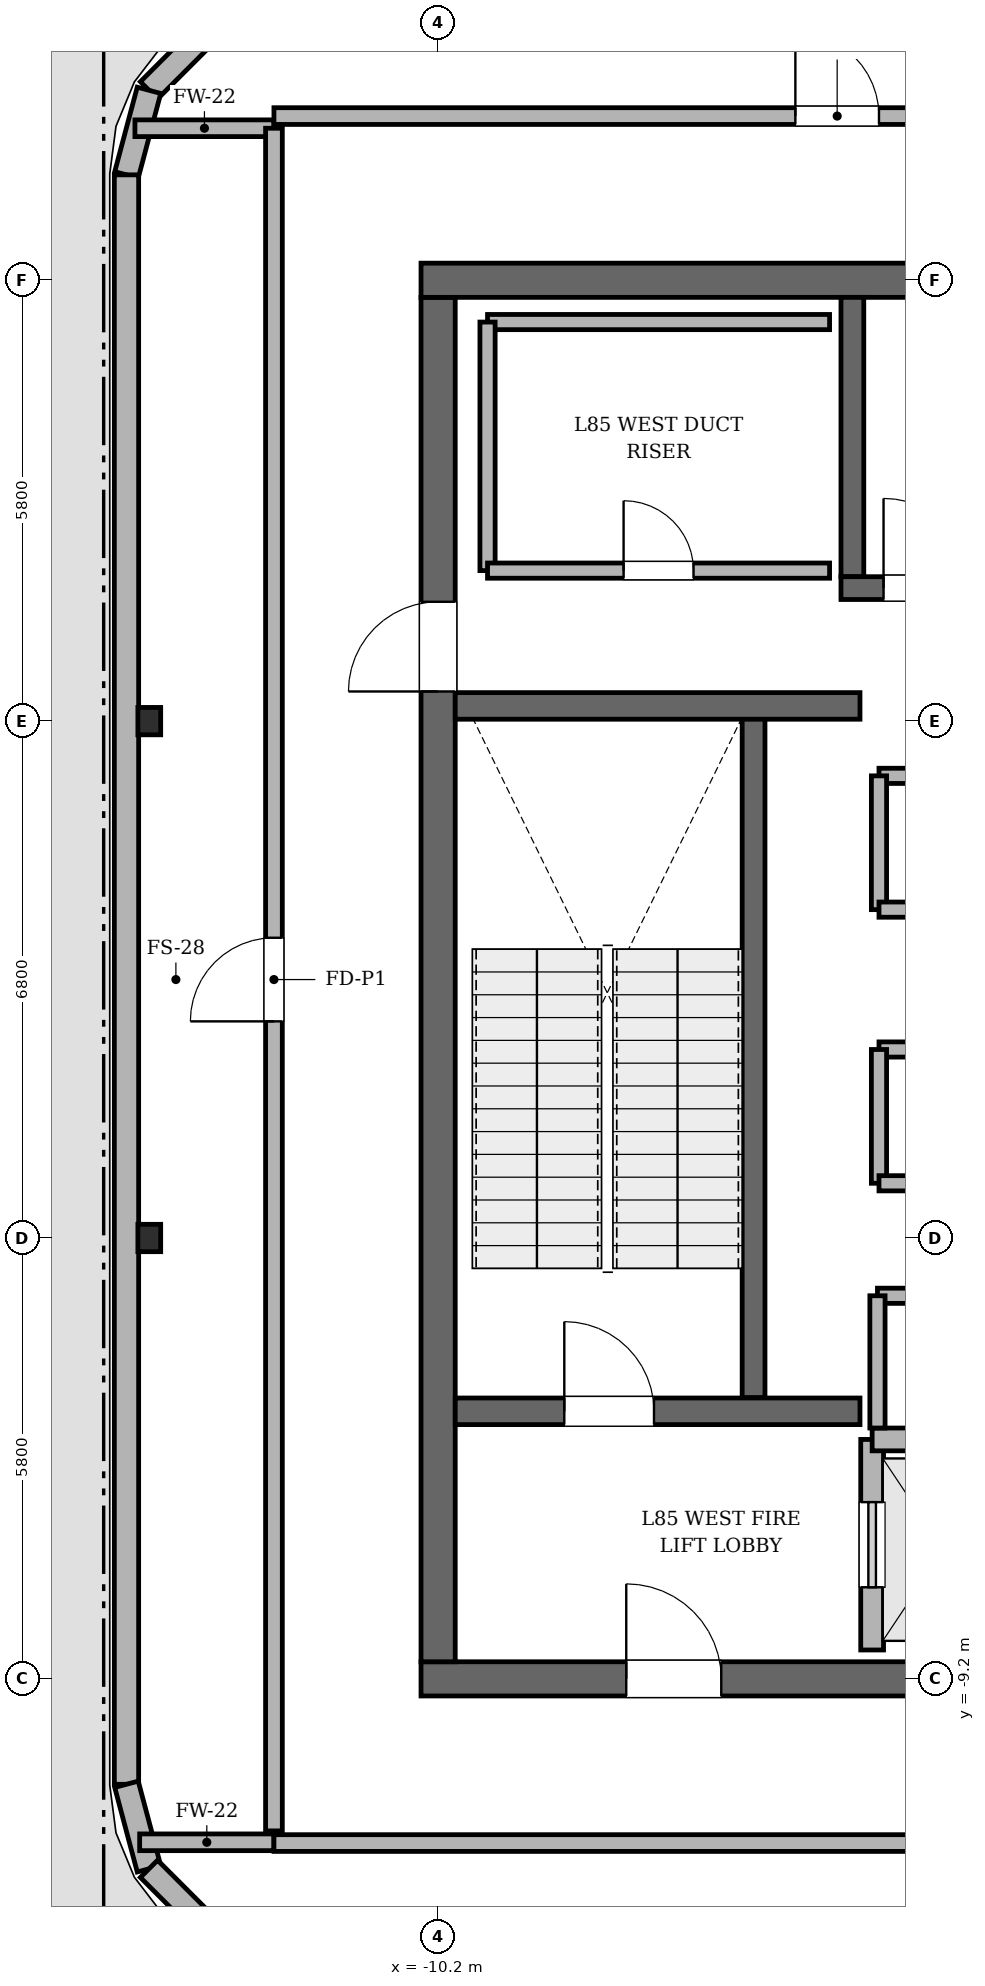
"""IFC4 building model, lengths in metres.
Left out: names, types, materials, properties, quantities, classifications, styles, units other than length and angle.
Written with IfcOpenShell. Run it as: python <this file> out.ifc"""

import sys

from ifc_helpers import new_model, si_unit, direction, frame, frame_2d, origin, origin_2d, place, context, subcontext, project, spatial, rectangle, i_section, extrude, element, fill, save


model = new_model("IFC4")
c1 = context("Model", 3, precision=1e-05, world=origin(), true_north=direction((0.0, 1.0)))
c2 = subcontext(c1, "Body", "Model", "MODEL_VIEW")
j1 = project(units=[si_unit("LENGTHUNIT", "METRE"), si_unit("PLANEANGLEUNIT", "RADIAN")], contexts=[c1])
p1 = place(None, origin())
s1 = spatial("IfcSite", under=j1, at=p1, CompositionType="ELEMENT")
p2 = place(p1, origin())
s2 = spatial("IfcBuilding", under=s1, at=p2, CompositionType="ELEMENT")
p3 = place(p2, frame((0.0, 0.0, 361.8)))
s3 = spatial("IfcBuildingStorey", under=s2, at=p3, CompositionType="ELEMENT", Elevation=361.8)
p4 = place(p3, frame((10.425, -9.2, 0.0), z_axis=(0.0, 0.0, 1.0), x_axis=(-1.0, 0.0, 0.0)))
e1 = element("IfcWall", 1, at=p4, inside=s3, PredefinedType="SHEAR", context=c2, shape_type="SweptSolid", body=[
    extrude(rectangle(XDim=20.85, YDim=0.45, at=frame_2d((10.425, 0.0))), origin(), (0.0, 0.0, 1.0), 4.5),
])
p5 = place(p4, frame((2.7, 0.0, 0.0)))
e2 = element("IfcOpeningElement", 2, at=p5, cuts=e1, PredefinedType="OPENING", context=c2, shape_type="SweptSolid", body=[
    extrude(rectangle(XDim=1.25, YDim=2.25, at=frame_2d((0.625, 1.125))), frame((0.0, 0.235, 0.0), z_axis=(0.0, -1.0, 0.0), x_axis=(1.0, 0.0, 0.0)), (0.0, 0.0, 1.0), 0.47),
])
p6 = place(p4, frame((16.9, 0.0, 0.0)))
e3 = element("IfcOpeningElement", 3, at=p6, cuts=e1, PredefinedType="OPENING", context=c2, shape_type="SweptSolid", body=[
    extrude(rectangle(XDim=1.25, YDim=2.25, at=frame_2d((0.625, 1.125))), frame((0.0, 0.235, 0.0), z_axis=(0.0, -1.0, 0.0), x_axis=(1.0, 0.0, 0.0)), (0.0, 0.0, 1.0), 0.47),
])
p7 = place(p3, frame((-10.2, -8.975, 0.0), z_axis=(0.0, 0.0, 1.0), x_axis=(0.0, 1.0, 0.0)))
e4 = element("IfcWall", 4, at=p7, inside=s3, PredefinedType="SHEAR", context=c2, shape_type="SweptSolid", body=[
    extrude(rectangle(XDim=17.95, YDim=0.45, at=frame_2d((8.975, 0.0))), origin(), (0.0, 0.0, 1.0), 4.5),
])
p8 = place(p7, frame((12.765, 0.0, 0.0)))
e5 = element("IfcOpeningElement", 5, at=p8, cuts=e4, PredefinedType="OPENING", context=c2, shape_type="SweptSolid", body=[
    extrude(rectangle(XDim=1.18, YDim=2.2, at=frame_2d((0.59, 1.1))), frame((0.0, 0.235, 0.0), z_axis=(0.0, -1.0, 0.0), x_axis=(1.0, 0.0, 0.0)), (0.0, 0.0, 1.0), 0.47),
])
p9 = place(p3, frame((-10.425, 9.2, 0.0), z_axis=(0.0, 0.0, 1.0), x_axis=(1.0, 0.0, 0.0)))
e6 = element("IfcWall", 6, at=p9, inside=s3, PredefinedType="SHEAR", context=c2, shape_type="SweptSolid", body=[
    extrude(rectangle(XDim=20.85, YDim=0.45, at=frame_2d((10.425, 0.0))), origin(), (0.0, 0.0, 1.0), 4.5),
])
p10 = place(p3, frame((-6.05, -5.5, 0.0), z_axis=(0.0, 0.0, 1.0), x_axis=(0.0, 1.0, 0.0)))
e7 = element("IfcWall", 7, at=p10, inside=s3, PredefinedType="SOLIDWALL", context=c2, shape_type="SweptSolid", body=[
    extrude(rectangle(XDim=8.95, YDim=0.3, at=frame_2d((4.475, 0.0))), origin(), (0.0, 0.0, 1.0), 4.5),
])
p11 = place(p3, frame((-4.75, 5.3, 0.0), z_axis=(0.0, 0.0, 1.0), x_axis=(0.0, 1.0, 0.0)))
e8 = element("IfcWall", 8, at=p11, inside=s3, PredefinedType="SOLIDWALL", context=c2, shape_type="SweptSolid", body=[
    extrude(rectangle(XDim=3.675, YDim=0.3, at=frame_2d((1.837, 0.0))), origin(), (0.0, 0.0, 1.0), 4.5),
])
p12 = place(p3, frame((-4.9, 5.15, 0.0), z_axis=(0.0, 0.0, 1.0), x_axis=(1.0, 0.0, 0.0)))
e9 = element("IfcWall", 9, at=p12, inside=s3, PredefinedType="SOLIDWALL", context=c2, shape_type="SweptSolid", body=[
    extrude(rectangle(XDim=9.8, YDim=0.3, at=frame_2d((4.9, 0.0))), origin(), (0.0, 0.0, 1.0), 4.5),
])
p13 = place(p12, frame((0.56, 0.0, 0.0)))
e10 = element("IfcOpeningElement", 10, at=p13, cuts=e9, PredefinedType="OPENING", context=c2, shape_type="SweptSolid", body=[
    extrude(rectangle(XDim=1.18, YDim=2.2, at=frame_2d((0.59, 1.1))), frame((0.0, 0.16, 0.0), z_axis=(0.0, -1.0, 0.0), x_axis=(1.0, 0.0, 0.0)), (0.0, 0.0, 1.0), 0.32),
])
p14 = place(p3, frame((-9.975, -5.68, 0.0), z_axis=(0.0, 0.0, 1.0), x_axis=(1.0, 0.0, 0.0)))
e11 = element("IfcWall", 11, at=p14, inside=s3, PredefinedType="SOLIDWALL", context=c2, shape_type="SweptSolid", body=[
    extrude(rectangle(XDim=5.325, YDim=0.35, at=frame_2d((2.663, 0.0))), origin(), (0.0, 0.0, 1.0), 4.5),
])
p15 = place(p14, frame((1.435, 0.0, 0.0)))
e12 = element("IfcOpeningElement", 12, at=p15, cuts=e11, PredefinedType="OPENING", context=c2, shape_type="SweptSolid", body=[
    extrude(rectangle(XDim=1.18, YDim=2.2, at=frame_2d((0.59, 1.1))), frame((0.0, 0.185, 0.0), z_axis=(0.0, -1.0, 0.0), x_axis=(1.0, 0.0, 0.0)), (0.0, 0.0, 1.0), 0.37),
])
p16 = place(p3, frame((-9.975, 3.6, 0.0), z_axis=(0.0, 0.0, 1.0), x_axis=(1.0, 0.0, 0.0)))
e13 = element("IfcWall", 13, at=p16, inside=s3, PredefinedType="SOLIDWALL", context=c2, shape_type="SweptSolid", body=[
    extrude(rectangle(XDim=5.325, YDim=0.35, at=frame_2d((2.663, 0.0))), origin(), (0.0, 0.0, 1.0), 4.5),
])
for number, where, z_axis, x_axis in (
    (14, (-14.0, -3.4, 0.0), (0.0, 0.0, 1.0), (1.0, 0.0, 0.0)),
    (15, (-14.0, 3.4, 0.0), (0.0, 0.0, 1.0), (1.0, 0.0, 0.0)),
):
    element("IfcColumn", number, at=place(p3, frame(where, z_axis=z_axis, x_axis=x_axis)), inside=s3, PredefinedType="COLUMN", context=c2, shape_type="SweptSolid", body=[
        extrude(i_section(OverallWidth=0.3, OverallDepth=0.36, WebThickness=0.012, FlangeThickness=0.022, FilletRadius=0.018, at=origin_2d()), origin(), (0.0, 0.0, 1.0), 4.498),
    ])
p17 = place(p3, frame((-13.199, 12.504, 0.0), z_axis=(0.0, 0.0, 1.0), x_axis=(-0.707106781187, -0.707106781187, 0.0)))
e16 = element("IfcWall", 16, at=p17, inside=s3, PredefinedType="SOLIDWALL", context=c2, shape_type="SweptSolid", body=[
    extrude(rectangle(XDim=1.138, YDim=0.32, at=frame_2d((0.569, 0.0))), origin(), (0.0, 0.0, 1.0), 2.994),
])
p18 = place(p3, frame((-14.004, 11.699, 0.0), z_axis=(0.0, 0.0, 1.0), x_axis=(-0.25727979053, -0.966336954372, 0.0)))
e17 = element("IfcWall", 17, at=p18, inside=s3, PredefinedType="SOLIDWALL", context=c2, shape_type="SweptSolid", body=[
    extrude(rectangle(XDim=1.151, YDim=0.32, at=frame_2d((0.576, 0.0))), origin(), (0.0, 0.0, 1.0), 2.994),
])
p19 = place(p3, frame((-14.3, 10.587, 0.0), z_axis=(0.0, 0.0, 1.0), x_axis=(0.0, -1.0, 0.0)))
e18 = element("IfcWall", 18, at=p19, inside=s3, PredefinedType="SOLIDWALL", context=c2, shape_type="SweptSolid", body=[
    extrude(rectangle(XDim=21.174, YDim=0.32, at=frame_2d((10.587, 0.0))), origin(), (0.0, 0.0, 1.0), 2.994),
])
p20 = place(p3, frame((-14.3, -10.587, 0.0), z_axis=(0.0, 0.0, 1.0), x_axis=(0.25727979053, -0.966336954372, 0.0)))
e19 = element("IfcWall", 19, at=p20, inside=s3, PredefinedType="SOLIDWALL", context=c2, shape_type="SweptSolid", body=[
    extrude(rectangle(XDim=1.151, YDim=0.32, at=frame_2d((0.576, 0.0))), origin(), (0.0, 0.0, 1.0), 2.994),
])
p21 = place(p3, frame((-14.004, -11.699, 0.0), z_axis=(0.0, 0.0, 1.0), x_axis=(0.707106781187, -0.707106781187, 0.0)))
e20 = element("IfcWall", 20, at=p21, inside=s3, PredefinedType="SOLIDWALL", context=c2, shape_type="SweptSolid", body=[
    extrude(rectangle(XDim=1.138, YDim=0.32, at=frame_2d((0.569, 0.0))), origin(), (0.0, 0.0, 1.0), 2.994),
])
p22 = place(p3, frame((-4.49, -8.82, 0.0), z_axis=(0.0, 0.0, 1.0), x_axis=(0.0, 1.0, 0.0)))
e21 = element("IfcWall", 21, at=p22, inside=s3, PredefinedType="SOLIDWALL", context=c2, shape_type="SweptSolid", body=[
    extrude(rectangle(XDim=2.77, YDim=0.3, at=frame_2d((1.385, 0.0))), origin(), (0.0, 0.0, 1.0), 4.28),
])
p23 = place(p22, frame((0.825, 0.0, 0.0)))
e22 = element("IfcOpeningElement", 22, at=p23, cuts=e21, PredefinedType="OPENING", context=c2, shape_type="SweptSolid", body=[
    extrude(rectangle(XDim=1.12, YDim=2.25, at=frame_2d((0.56, 1.125))), frame((0.0, 0.16, 0.0), z_axis=(0.0, -1.0, 0.0), x_axis=(1.0, 0.0, 0.0)), (0.0, 0.0, 1.0), 0.32),
])
p24 = place(p3, frame((-4.49, -6.05, 0.0), z_axis=(0.0, 0.0, 1.0), x_axis=(1.0, 0.0, 0.0)))
e23 = element("IfcWall", 23, at=p24, inside=s3, PredefinedType="SOLIDWALL", context=c2, shape_type="SweptSolid", body=[
    extrude(rectangle(XDim=1.88, YDim=0.3, at=frame_2d((0.94, 0.0))), origin(), (0.0, 0.0, 1.0), 4.28),
])
p25 = place(p3, frame((-2.32, -4.16, 0.0), z_axis=(0.0, 0.0, 1.0), x_axis=(-1.0, 0.0, 0.0)))
e24 = element("IfcWall", 24, at=p25, inside=s3, PredefinedType="SOLIDWALL", context=c2, shape_type="SweptSolid", body=[
    extrude(rectangle(XDim=2.1, YDim=0.2, at=frame_2d((1.05, 0.0))), origin(), (0.0, 0.0, 1.0), 4.28),
])
p26 = place(p25, frame((0.575, 0.0, 0.0)))
e25 = element("IfcOpeningElement", 25, at=p26, cuts=e24, PredefinedType="OPENING", context=c2, shape_type="SweptSolid", body=[
    extrude(rectangle(XDim=0.95, YDim=2.15, at=frame_2d((0.475, 1.075))), frame((0.0, 0.11, 0.0), z_axis=(0.0, -1.0, 0.0), x_axis=(1.0, 0.0, 0.0)), (0.0, 0.0, 1.0), 0.22),
])
p27 = place(p3, frame((-4.42, -4.16, 0.0), z_axis=(0.0, 0.0, 1.0), x_axis=(0.0, -1.0, 0.0)))
e26 = element("IfcWall", 26, at=p27, inside=s3, PredefinedType="SOLIDWALL", context=c2, shape_type="SweptSolid", body=[
    extrude(rectangle(XDim=1.74, YDim=0.2, at=frame_2d((0.87, 0.0))), origin(), (0.0, 0.0, 1.0), 4.28),
])
p28 = place(p3, frame((4.4, -0.92, 0.0), z_axis=(0.0, 0.0, 1.0), x_axis=(-1.0, 0.0, 0.0)))
e27 = element("IfcWall", 27, at=p28, inside=s3, PredefinedType="SOLIDWALL", context=c2, shape_type="SweptSolid", body=[
    extrude(rectangle(XDim=8.8, YDim=0.2, at=frame_2d((4.4, 0.0))), origin(), (0.0, 0.0, 1.0), 4.28),
])
p29 = place(p3, frame((-4.4, -0.92, 0.0), z_axis=(0.0, 0.0, 1.0), x_axis=(0.0, -1.0, 0.0)))
e28 = element("IfcWall", 28, at=p29, inside=s3, PredefinedType="SOLIDWALL", context=c2, shape_type="SweptSolid", body=[
    extrude(rectangle(XDim=1.76, YDim=0.2, at=frame_2d((0.88, 0.0))), origin(), (0.0, 0.0, 1.0), 4.28),
])
for number, where, z_axis, x_axis in (
    (29, (-4.4, -2.68, 0.0), (0.0, 0.0, 1.0), (1.0, 0.0, 0.0)),
    (30, (4.4, 2.68, 0.0), (0.0, 0.0, 1.0), (-1.0, 0.0, 0.0)),
):
    element("IfcWall", number, at=place(p3, frame(where, z_axis=z_axis, x_axis=x_axis)), inside=s3, PredefinedType="SOLIDWALL", context=c2, shape_type="SweptSolid", body=[
        extrude(rectangle(XDim=8.8, YDim=0.2, at=frame_2d((4.4, 0.0))), origin(), (0.0, 0.0, 1.0), 4.28),
    ])
p30 = place(p3, frame((-4.4, 2.68, 0.0), z_axis=(0.0, 0.0, 1.0), x_axis=(0.0, -1.0, 0.0)))
e31 = element("IfcWall", 31, at=p30, inside=s3, PredefinedType="SOLIDWALL", context=c2, shape_type="SweptSolid", body=[
    extrude(rectangle(XDim=1.76, YDim=0.2, at=frame_2d((0.88, 0.0))), origin(), (0.0, 0.0, 1.0), 4.28),
])
p31 = place(p3, frame((-4.4, 0.92, 0.0), z_axis=(0.0, 0.0, 1.0), x_axis=(1.0, 0.0, 0.0)))
e32 = element("IfcWall", 32, at=p31, inside=s3, PredefinedType="SOLIDWALL", context=c2, shape_type="SweptSolid", body=[
    extrude(rectangle(XDim=8.8, YDim=0.2, at=frame_2d((4.4, 0.0))), origin(), (0.0, 0.0, 1.0), 4.28),
])
p32 = place(p3, frame((-5.05, 8.65, 0.0), z_axis=(0.0, 0.0, 1.0), x_axis=(-1.0, 0.0, 0.0)))
e33 = element("IfcWall", 33, at=p32, inside=s3, PredefinedType="SOLIDWALL", context=c2, shape_type="SweptSolid", body=[
    extrude(rectangle(XDim=4.5, YDim=0.2, at=frame_2d((2.25, 0.0))), origin(), (0.0, 0.0, 1.0), 4.28),
])
p33 = place(p3, frame((-9.55, 8.65, 0.0), z_axis=(0.0, 0.0, 1.0), x_axis=(0.0, -1.0, 0.0)))
e34 = element("IfcWall", 34, at=p33, inside=s3, PredefinedType="SOLIDWALL", context=c2, shape_type="SweptSolid", body=[
    extrude(rectangle(XDim=3.27, YDim=0.2, at=frame_2d((1.635, 0.0))), origin(), (0.0, 0.0, 1.0), 4.28),
])
p34 = place(p3, frame((-9.55, 5.38, 0.0), z_axis=(0.0, 0.0, 1.0), x_axis=(1.0, 0.0, 0.0)))
e35 = element("IfcWall", 35, at=p34, inside=s3, PredefinedType="SOLIDWALL", context=c2, shape_type="SweptSolid", body=[
    extrude(rectangle(XDim=4.5, YDim=0.2, at=frame_2d((2.25, 0.0))), origin(), (0.0, 0.0, 1.0), 4.28),
])
p35 = place(p34, frame((1.79, 0.0, 0.0)))
e36 = element("IfcOpeningElement", 36, at=p35, cuts=e35, PredefinedType="OPENING", context=c2, shape_type="SweptSolid", body=[
    extrude(rectangle(XDim=0.92, YDim=2.1, at=frame_2d((0.46, 1.05))), frame((0.0, 0.11, 0.0), z_axis=(0.0, -1.0, 0.0), x_axis=(1.0, 0.0, 0.0)), (0.0, 0.0, 1.0), 0.22),
])
p36 = place(p3, frame((-14.127, -11.35, 0.0), z_axis=(0.0, 0.0, 1.0), x_axis=(1.0, 0.0, 0.0)))
e37 = element("IfcWall", 37, at=p36, inside=s3, PredefinedType="SOLIDWALL", context=c2, shape_type="SweptSolid", body=[
    extrude(rectangle(XDim=1.767, YDim=0.22, at=frame_2d((0.883, 0.0))), origin(), (0.0, 0.0, 1.0), 2.994),
])
p37 = place(p3, frame((-12.36, -11.36, 0.0), z_axis=(0.0, 0.0, 1.0), x_axis=(1.0, 0.0, 0.0)))
e38 = element("IfcWall", 38, at=p37, inside=s3, PredefinedType="SOLIDWALL", context=c2, shape_type="SweptSolid", body=[
    extrude(rectangle(XDim=24.72, YDim=0.22, at=frame_2d((12.36, 0.0))), origin(), (0.0, 0.0, 1.0), 2.994),
])
p38 = place(p37, frame((16.76, 0.0, 0.0)))
e39 = element("IfcOpeningElement", 39, at=p38, cuts=e38, PredefinedType="OPENING", context=c2, shape_type="SweptSolid", body=[
    extrude(rectangle(XDim=1.1, YDim=2.2, at=frame_2d((0.55, 1.1))), frame((0.0, 0.12, 0.0), z_axis=(0.0, -1.0, 0.0), x_axis=(1.0, 0.0, 0.0)), (0.0, 0.0, 1.0), 0.24),
])
p39 = place(p3, frame((-14.189, 11.2, 0.0), z_axis=(0.0, 0.0, 1.0), x_axis=(1.0, 0.0, 0.0)))
e40 = element("IfcWall", 40, at=p39, inside=s3, PredefinedType="SOLIDWALL", context=c2, shape_type="SweptSolid", body=[
    extrude(rectangle(XDim=1.829, YDim=0.22, at=frame_2d((0.915, 0.0))), origin(), (0.0, 0.0, 1.0), 2.994),
])
p40 = place(p3, frame((-12.36, 11.2, 0.0), z_axis=(0.0, 0.0, 1.0), x_axis=(0.0, -1.0, 0.0)))
e41 = element("IfcWall", 41, at=p40, inside=s3, PredefinedType="SOLIDWALL", context=c2, shape_type="SweptSolid", body=[
    extrude(rectangle(XDim=22.4, YDim=0.22, at=frame_2d((11.2, 0.0))), origin(), (0.0, 0.0, 1.0), 2.994),
])
p41 = place(p40, frame((10.65, 0.0, 0.0)))
e42 = element("IfcOpeningElement", 42, at=p41, cuts=e41, PredefinedType="OPENING", context=c2, shape_type="SweptSolid", body=[
    extrude(rectangle(XDim=1.1, YDim=2.2, at=frame_2d((0.55, 1.1))), frame((0.0, 0.12, 0.0), z_axis=(0.0, -1.0, 0.0), x_axis=(1.0, 0.0, 0.0)), (0.0, 0.0, 1.0), 0.24),
])
p42 = place(p3, frame((12.36, 11.36, 0.0), z_axis=(0.0, 0.0, 1.0), x_axis=(-1.0, 0.0, 0.0)))
e43 = element("IfcWall", 43, at=p42, inside=s3, PredefinedType="SOLIDWALL", context=c2, shape_type="SweptSolid", body=[
    extrude(rectangle(XDim=24.72, YDim=0.22, at=frame_2d((12.36, 0.0))), origin(), (0.0, 0.0, 1.0), 2.994),
])
p43 = place(p42, frame((16.76, 0.0, 0.0)))
e44 = element("IfcOpeningElement", 44, at=p43, cuts=e43, PredefinedType="OPENING", context=c2, shape_type="SweptSolid", body=[
    extrude(rectangle(XDim=1.1, YDim=2.2, at=frame_2d((0.55, 1.1))), frame((0.0, 0.12, 0.0), z_axis=(0.0, -1.0, 0.0), x_axis=(1.0, 0.0, 0.0)), (0.0, 0.0, 1.0), 0.24),
])
p44 = place(p15, origin())
e45 = element("IfcDoor", 45, at=p44, inside=s3, OperationType="SINGLE_SWING_LEFT", PredefinedType="DOOR", context=c2, shape_type="SweptSolid", body=[
    extrude(rectangle(XDim=1.18, YDim=2.2, at=frame_2d((0.59, 1.1))), frame((0.0, 0.025, 0.0), z_axis=(0.0, -1.0, 0.0), x_axis=(1.0, 0.0, 0.0)), (0.0, 0.0, 1.0), 0.05),
])
fill(e12, e45)
p45 = place(p13, origin())
e46 = element("IfcDoor", 46, at=p45, inside=s3, OperationType="SINGLE_SWING_LEFT", PredefinedType="DOOR", context=c2, shape_type="SweptSolid", body=[
    extrude(rectangle(XDim=1.18, YDim=2.2, at=frame_2d((0.59, 1.1))), frame((0.0, 0.025, 0.0), z_axis=(0.0, -1.0, 0.0), x_axis=(1.0, 0.0, 0.0)), (0.0, 0.0, 1.0), 0.05),
])
fill(e10, e46)
p46 = place(p6, origin())
e47 = element("IfcDoor", 47, at=p46, inside=s3, OperationType="SINGLE_SWING_RIGHT", PredefinedType="DOOR", context=c2, shape_type="SweptSolid", body=[
    extrude(rectangle(XDim=1.25, YDim=2.25, at=frame_2d((0.625, 1.125))), frame((0.0, 0.025, 0.0), z_axis=(0.0, -1.0, 0.0), x_axis=(1.0, 0.0, 0.0)), (0.0, 0.0, 1.0), 0.05),
])
fill(e3, e47)
p47 = place(p8, origin())
e48 = element("IfcDoor", 48, at=p47, inside=s3, OperationType="SINGLE_SWING_LEFT", PredefinedType="DOOR", context=c2, shape_type="SweptSolid", body=[
    extrude(rectangle(XDim=1.18, YDim=2.2, at=frame_2d((0.59, 1.1))), frame((0.0, 0.025, 0.0), z_axis=(0.0, -1.0, 0.0), x_axis=(1.0, 0.0, 0.0)), (0.0, 0.0, 1.0), 0.05),
])
fill(e5, e48)
p48 = place(p23, origin())
e49 = element("IfcDoor", 49, at=p48, inside=s3, OperationType="SLIDING_TO_LEFT", PredefinedType="DOOR", context=c2, shape_type="SweptSolid", body=[
    extrude(rectangle(XDim=1.12, YDim=2.25, at=frame_2d((0.56, 1.125))), frame((0.0, 0.025, 0.0), z_axis=(0.0, -1.0, 0.0), x_axis=(1.0, 0.0, 0.0)), (0.0, 0.0, 1.0), 0.05),
])
fill(e22, e49)
p49 = place(p35, origin())
e50 = element("IfcDoor", 50, at=p49, inside=s3, OperationType="SINGLE_SWING_LEFT", PredefinedType="DOOR", context=c2, shape_type="SweptSolid", body=[
    extrude(rectangle(XDim=0.92, YDim=2.1, at=frame_2d((0.46, 1.05))), frame((0.0, 0.025, 0.0), z_axis=(0.0, -1.0, 0.0), x_axis=(1.0, 0.0, 0.0)), (0.0, 0.0, 1.0), 0.05),
])
fill(e36, e50)
p50 = place(p41, origin())
e51 = element("IfcDoor", 51, at=p50, inside=s3, OperationType="SINGLE_SWING_RIGHT", PredefinedType="DOOR", context=c2, shape_type="SweptSolid", body=[
    extrude(rectangle(XDim=1.1, YDim=2.2, at=frame_2d((0.55, 1.1))), frame((0.0, 0.025, 0.0), z_axis=(0.0, -1.0, 0.0), x_axis=(1.0, 0.0, 0.0)), (0.0, 0.0, 1.0), 0.05),
])
fill(e42, e51)
p51 = place(p43, origin())
e52 = element("IfcDoor", 52, at=p51, inside=s3, OperationType="SINGLE_SWING_RIGHT", PredefinedType="DOOR", context=c2, shape_type="SweptSolid", body=[
    extrude(rectangle(XDim=1.1, YDim=2.2, at=frame_2d((0.55, 1.1))), frame((0.0, 0.025, 0.0), z_axis=(0.0, -1.0, 0.0), x_axis=(1.0, 0.0, 0.0)), (0.0, 0.0, 1.0), 0.05),
])
fill(e44, e52)
save(model, sys.argv[1])
